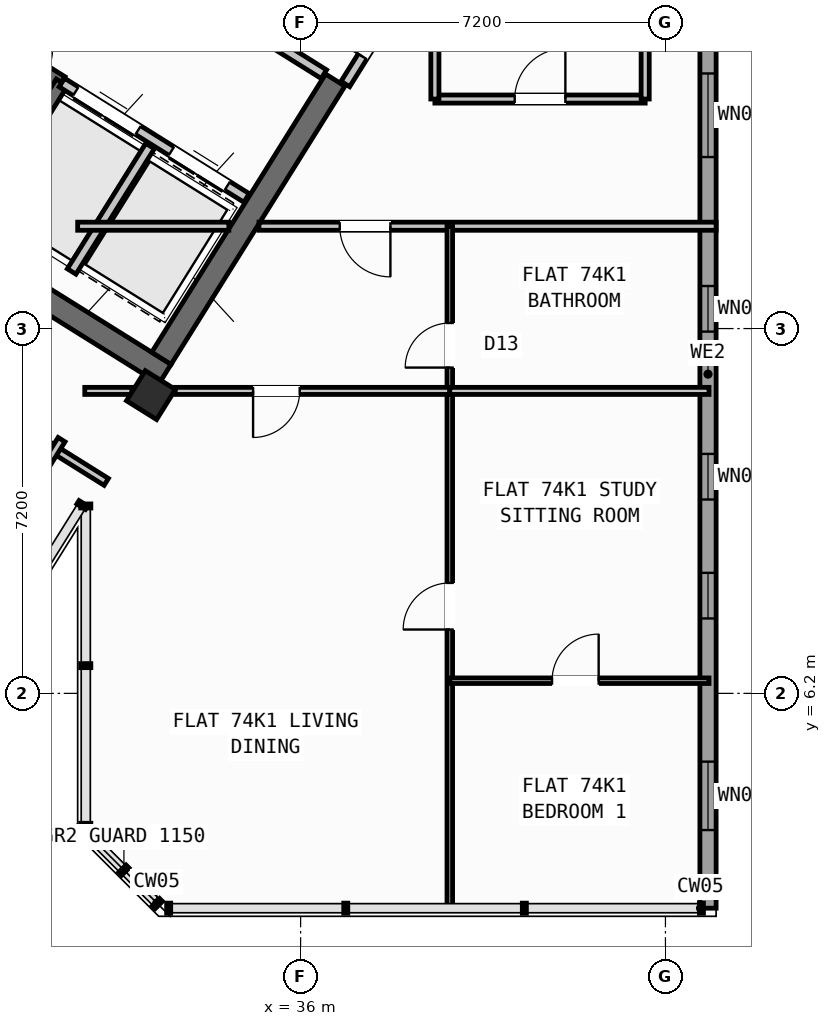
"""IFC4 building model, lengths in metres.
Left out: names, types, materials, properties, quantities, classifications, styles, units other than length and angle.
Written with IfcOpenShell. Run it as: python <this file> out.ifc"""

import sys

from ifc_helpers import new_model, si_unit, direction, frame, frame_2d, origin, origin_2d, place, context, subcontext, project, spatial, rectangle, hollow_rectangle, extrude, source, transform, mapped, element, fill, save


model = new_model("IFC4")
c1 = context("Model", 3, precision=1e-05, world=origin(), true_north=direction((0.0, 1.0)))
c2 = subcontext(c1, "Body", "Model", "MODEL_VIEW")
j1 = project(units=[si_unit("LENGTHUNIT", "METRE"), si_unit("PLANEANGLEUNIT", "RADIAN")], contexts=[c1])
p1 = place(None, origin())
s1 = spatial("IfcSite", under=j1, at=p1, CompositionType="ELEMENT")
p2 = place(p1, origin())
s2 = spatial("IfcBuilding", under=s1, at=p2, CompositionType="ELEMENT")
p3 = place(p2, frame((0.0, 0.0, 291.6)))
s3 = spatial("IfcBuildingStorey", under=s2, at=p3, CompositionType="ELEMENT", Elevation=291.6)
p4 = place(p3, frame((33.324, 12.503, 0.0), z_axis=(0.0, 0.0, 1.0), x_axis=(-0.848043529849, 0.529926571782, 0.0)))
e1 = element("IfcWall", 1, at=p4, inside=s3, PredefinedType="SHEAR", context=c2, shape_type="SweptSolid", body=[
    extrude(rectangle(XDim=13.04, YDim=0.45, at=frame_2d((6.52, 0.0))), origin(), (0.0, 0.0, 1.0), 3.35),
])
p5 = place(p3, frame((36.683, 18.304, 0.0), z_axis=(0.0, 0.0, 1.0), x_axis=(-0.529904039071, -0.848057609704, 0.0)))
e2 = element("IfcWall", 2, at=p5, inside=s3, PredefinedType="SHEAR", context=c2, shape_type="SweptSolid", body=[
    extrude(rectangle(XDim=6.475, YDim=0.45, at=frame_2d((3.238, 0.0))), origin(), (0.0, 0.0, 1.0), 3.35),
])
m1 = source(origin(), c2, "Body", "SweptSolid", [
    extrude(hollow_rectangle(XDim=0.7, YDim=0.7, WallThickness=0.028, at=origin_2d()), origin(), (0.0, 0.0, 1.0), 3.6),
])
p6 = place(p3, frame((33.046, 12.087, 0.0), z_axis=(0.0, 0.0, 1.0), x_axis=(-0.848048096156, 0.529919264233, 0.0)))
e3 = element("IfcColumn", 3, at=p6, inside=s3, PredefinedType="COLUMN", context=c2, shape_type="MappedRepresentation", body=[
    mapped(m1, transform((0.0, 0.0, 0.0), scale=1.0)),
])
p7 = place(p3, frame((44.04, 23.04, 0.0), z_axis=(0.0, 0.0, 1.0), x_axis=(0.0, -1.0, 0.0)))
e4 = element("IfcWall", 4, at=p7, inside=s3, PredefinedType="STANDARD", context=c2, shape_type="SweptSolid", body=[
    extrude(rectangle(XDim=21.08, YDim=0.32, at=frame_2d((10.54, 0.0))), origin(), (0.0, 0.0, 1.0), 3.35),
])
p8 = place(p7, frame((1.285, 0.0, 0.9)))
e5 = element("IfcOpeningElement", 5, at=p8, cuts=e4, PredefinedType="OPENING", context=c2, shape_type="SweptSolid", body=[
    extrude(rectangle(XDim=1.65, YDim=1.45, at=frame_2d((0.825, 0.725))), frame((0.0, 0.17, 0.0), z_axis=(0.0, -1.0, 0.0), x_axis=(1.0, 0.0, 0.0)), (0.0, 0.0, 1.0), 0.34),
])
p9 = place(p7, frame((4.605, 0.0, 0.9)))
e6 = element("IfcOpeningElement", 6, at=p9, cuts=e4, PredefinedType="OPENING", context=c2, shape_type="SweptSolid", body=[
    extrude(rectangle(XDim=1.65, YDim=1.45, at=frame_2d((0.825, 0.725))), frame((0.0, 0.17, 0.0), z_axis=(0.0, -1.0, 0.0), x_axis=(1.0, 0.0, 0.0)), (0.0, 0.0, 1.0), 0.34),
])
p10 = place(p7, frame((8.8, 0.0, 1.0)))
e7 = element("IfcOpeningElement", 7, at=p10, cuts=e4, PredefinedType="OPENING", context=c2, shape_type="SweptSolid", body=[
    extrude(rectangle(XDim=0.9, YDim=1.25, at=frame_2d((0.45, 0.625))), frame((0.0, 0.17, 0.0), z_axis=(0.0, -1.0, 0.0), x_axis=(1.0, 0.0, 0.0)), (0.0, 0.0, 1.0), 0.34),
])
p11 = place(p7, frame((12.114, 0.0, 1.0)))
e8 = element("IfcOpeningElement", 8, at=p11, cuts=e4, PredefinedType="OPENING", context=c2, shape_type="SweptSolid", body=[
    extrude(rectangle(XDim=0.9, YDim=1.25, at=frame_2d((0.45, 0.625))), frame((0.0, 0.17, 0.0), z_axis=(0.0, -1.0, 0.0), x_axis=(1.0, 0.0, 0.0)), (0.0, 0.0, 1.0), 0.34),
])
p12 = place(p7, frame((14.461, 0.0, 1.0)))
e9 = element("IfcOpeningElement", 9, at=p12, cuts=e4, PredefinedType="OPENING", context=c2, shape_type="SweptSolid", body=[
    extrude(rectangle(XDim=0.9, YDim=1.25, at=frame_2d((0.45, 0.625))), frame((0.0, 0.17, 0.0), z_axis=(0.0, -1.0, 0.0), x_axis=(1.0, 0.0, 0.0)), (0.0, 0.0, 1.0), 0.34),
])
p13 = place(p7, frame((18.188, 0.0, 0.9)))
e10 = element("IfcOpeningElement", 10, at=p13, cuts=e4, PredefinedType="OPENING", context=c2, shape_type="SweptSolid", body=[
    extrude(rectangle(XDim=1.35, YDim=1.45, at=frame_2d((0.675, 0.725))), frame((0.0, 0.17, 0.0), z_axis=(0.0, -1.0, 0.0), x_axis=(1.0, 0.0, 0.0)), (0.0, 0.0, 1.0), 0.34),
])
p14 = place(p3, frame((31.28, 18.261, 0.0), z_axis=(0.0, 0.0, 1.0), x_axis=(-0.848051618787, 0.529913626805, 0.0)))
e11 = element("IfcWall", 11, at=p14, inside=s3, PredefinedType="SHEAR", context=c2, shape_type="SweptSolid", body=[
    extrude(rectangle(XDim=7.46, YDim=0.26, at=frame_2d((3.73, 0.0))), origin(), (0.0, 0.0, 1.0), 3.35),
])
p15 = place(p14, frame((0.36, 0.0, 0.0)))
e12 = element("IfcOpeningElement", 12, at=p15, cuts=e11, PredefinedType="OPENING", context=c2, shape_type="SweptSolid", body=[
    extrude(rectangle(XDim=0.86, YDim=2.05, at=frame_2d((0.43, 1.025))), frame((0.0, 0.14, 0.0), z_axis=(0.0, -1.0, 0.0), x_axis=(1.0, 0.0, 0.0)), (0.0, 0.0, 1.0), 0.28),
])
p16 = place(p3, frame((31.288, 18.256, 0.0), z_axis=(0.0, 0.0, 1.0), x_axis=(-0.529943379326, -0.848033026897, 0.0)))
e13 = element("IfcWall", 13, at=p16, inside=s3, PredefinedType="SHEAR", context=c2, shape_type="SweptSolid", body=[
    extrude(rectangle(XDim=3.16, YDim=0.26, at=frame_2d((1.58, 0.0))), origin(), (0.0, 0.0, 1.0), 3.35),
])
p17 = place(p3, frame((34.933, 15.978, 0.0), z_axis=(0.0, 0.0, 1.0), x_axis=(-0.848055739377, 0.529907032327, 0.0)))
e14 = element("IfcWall", 14, at=p17, inside=s3, PredefinedType="STANDARD", context=c2, shape_type="SweptSolid", body=[
    extrude(rectangle(XDim=4.298, YDim=0.2, at=frame_2d((2.149, 0.0))), origin(), (0.0, 0.0, 1.0), 3.34),
])
p18 = place(p17, frame((0.448, 0.0, 0.0)))
e15 = element("IfcOpeningElement", 15, at=p18, cuts=e14, PredefinedType="OPENING", context=c2, shape_type="SweptSolid", body=[
    extrude(rectangle(XDim=1.3, YDim=2.2, at=frame_2d((0.65, 1.1))), frame((0.0, 0.11, 0.0), z_axis=(0.0, -1.0, 0.0), x_axis=(1.0, 0.0, 0.0)), (0.0, 0.0, 1.0), 0.22),
])
p19 = place(p17, frame((2.523, 0.0, 0.0)))
e16 = element("IfcOpeningElement", 16, at=p19, cuts=e14, PredefinedType="OPENING", context=c2, shape_type="SweptSolid", body=[
    extrude(rectangle(XDim=1.45, YDim=2.25, at=frame_2d((0.725, 1.125))), frame((0.0, 0.11, 0.0), z_axis=(0.0, -1.0, 0.0), x_axis=(1.0, 0.0, 0.0)), (0.0, 0.0, 1.0), 0.22),
])
p20 = place(p3, frame((36.459, 18.421, 0.0), z_axis=(0.0, 0.0, 1.0), x_axis=(-0.848059591691, 0.529900867089, 0.0)))
e17 = element("IfcWall", 17, at=p20, inside=s3, PredefinedType="STANDARD", context=c2, shape_type="SweptSolid", body=[
    extrude(rectangle(XDim=5.818, YDim=0.2, at=frame_2d((2.909, 0.0))), origin(), (0.0, 0.0, 1.0), 3.34),
])
p21 = place(p20, frame((2.598, 0.0, 0.0)))
e18 = element("IfcOpeningElement", 18, at=p21, cuts=e17, PredefinedType="OPENING", context=c2, shape_type="SweptSolid", body=[
    extrude(rectangle(XDim=1.15, YDim=2.1, at=frame_2d((0.575, 1.05))), frame((0.0, 0.11, 0.0), z_axis=(0.0, -1.0, 0.0), x_axis=(1.0, 0.0, 0.0)), (0.0, 0.0, 1.0), 0.22),
])
p22 = place(p3, frame((33.029, 17.003, 0.0), z_axis=(0.0, 0.0, 1.0), x_axis=(-0.529916267533, -0.848049968695, 0.0)))
e19 = element("IfcWall", 19, at=p22, inside=s3, PredefinedType="STANDARD", context=c2, shape_type="SweptSolid", body=[
    extrude(rectangle(XDim=2.92, YDim=0.2, at=frame_2d((1.46, 0.0))), origin(), (0.0, 0.0, 1.0), 3.34),
])
p23 = place(p3, frame((32.164, 10.374, 0.0), z_axis=(0.0, 0.0, 1.0), x_axis=(-0.848044107957, 0.529925646633, 0.0)))
e20 = element("IfcWall", 20, at=p23, inside=s3, PredefinedType="PARTITIONING", context=c2, shape_type="SweptSolid", body=[
    extrude(rectangle(XDim=15.57, YDim=0.16, at=frame_2d((7.785, 0.0))), origin(), (0.0, 0.0, 1.0), 3.34),
])
p24 = place(p23, frame((10.83, 0.0, 0.0)))
e21 = element("IfcOpeningElement", 21, at=p24, cuts=e20, PredefinedType="OPENING", context=c2, shape_type="SweptSolid", body=[
    extrude(rectangle(XDim=1.0, YDim=2.1, at=frame_2d((0.5, 1.05))), frame((0.0, 0.09, 0.0), z_axis=(0.0, -1.0, 0.0), x_axis=(1.0, 0.0, 0.0)), (0.0, 0.0, 1.0), 0.18),
])
p25 = place(p3, frame((31.282, 11.208, 0.0), z_axis=(0.0, 0.0, 1.0), x_axis=(-0.529938869374, -0.84803584519, 0.0)))
e22 = element("IfcWall", 22, at=p25, inside=s3, PredefinedType="PARTITIONING", context=c2, shape_type="SweptSolid", body=[
    extrude(rectangle(XDim=5.48, YDim=0.16, at=frame_2d((2.74, 0.0))), origin(), (0.0, 0.0, 1.0), 3.34),
])
p26 = place(p3, frame((38.451, 20.737, 0.0), z_axis=(0.0, 0.0, 1.0), x_axis=(-0.529924799939, -0.848044637038, 0.0)))
e23 = element("IfcWall", 23, at=p26, inside=s3, PredefinedType="STANDARD", context=c2, shape_type="SweptSolid", body=[
    extrude(rectangle(XDim=2.96, YDim=0.2, at=frame_2d((1.48, 0.0))), origin(), (0.0, 0.0, 1.0), 3.34),
])
p27 = place(p26, frame((1.46, 0.0, 0.0)))
e24 = element("IfcOpeningElement", 24, at=p27, cuts=e23, PredefinedType="OPENING", context=c2, shape_type="SweptSolid", body=[
    extrude(rectangle(XDim=0.86, YDim=2.05, at=frame_2d((0.43, 1.025))), frame((0.0, 0.11, 0.0), z_axis=(0.0, -1.0, 0.0), x_axis=(1.0, 0.0, 0.0)), (0.0, 0.0, 1.0), 0.22),
])
p28 = place(p3, frame((31.6, 15.42, 0.0), z_axis=(0.0, 0.0, 1.0), x_axis=(1.0, 0.0, 0.0)))
e25 = element("IfcWall", 25, at=p28, inside=s3, PredefinedType="PARTITIONING", context=c2, shape_type="SweptSolid", body=[
    extrude(rectangle(XDim=2.984, YDim=0.16, at=frame_2d((1.492, 0.0))), origin(), (0.0, 0.0, 1.0), 3.34),
])
p29 = place(p3, frame((35.178, 15.42, 0.0), z_axis=(0.0, 0.0, 1.0), x_axis=(1.0, 0.0, 0.0)))
e26 = element("IfcWall", 26, at=p29, inside=s3, PredefinedType="PARTITIONING", context=c2, shape_type="SweptSolid", body=[
    extrude(rectangle(XDim=9.021, YDim=0.16, at=frame_2d((4.511, 0.0))), origin(), (0.0, 0.0, 1.0), 3.34),
])
p30 = place(p29, frame((1.594, 0.0, 0.0)))
e27 = element("IfcOpeningElement", 27, at=p30, cuts=e26, PredefinedType="OPENING", context=c2, shape_type="SweptSolid", body=[
    extrude(rectangle(XDim=1.0, YDim=2.1, at=frame_2d((0.5, 1.05))), frame((0.0, 0.09, 0.0), z_axis=(0.0, -1.0, 0.0), x_axis=(1.0, 0.0, 0.0)), (0.0, 0.0, 1.0), 0.18),
])
p31 = place(p3, frame((38.65, 17.93, 0.0), z_axis=(0.0, 0.0, 1.0), x_axis=(1.0, 0.0, 0.0)))
e28 = element("IfcWall", 28, at=p31, inside=s3, PredefinedType="PARTITIONING", context=c2, shape_type="SweptSolid", body=[
    extrude(rectangle(XDim=4.15, YDim=0.16, at=frame_2d((2.075, 0.0))), origin(), (0.0, 0.0, 1.0), 3.34),
])
p32 = place(p31, frame((1.575, 0.0, 0.0)))
e29 = element("IfcOpeningElement", 29, at=p32, cuts=e28, PredefinedType="OPENING", context=c2, shape_type="SweptSolid", body=[
    extrude(rectangle(XDim=1.0, YDim=2.1, at=frame_2d((0.5, 1.05))), frame((0.0, 0.09, 0.0), z_axis=(0.0, -1.0, 0.0), x_axis=(1.0, 0.0, 0.0)), (0.0, 0.0, 1.0), 0.18),
])
p33 = place(p3, frame((38.65, 17.93, 0.0), z_axis=(0.0, 0.0, 1.0), x_axis=(0.0, 1.0, 0.0)))
e30 = element("IfcWall", 30, at=p33, inside=s3, PredefinedType="PARTITIONING", context=c2, shape_type="SweptSolid", body=[
    extrude(rectangle(XDim=3.046, YDim=0.16, at=frame_2d((1.523, 0.0))), origin(), (0.0, 0.0, 1.0), 3.34),
])
p34 = place(p3, frame((42.8, 17.93, 0.0), z_axis=(0.0, 0.0, 1.0), x_axis=(0.0, 1.0, 0.0)))
e31 = element("IfcWall", 31, at=p34, inside=s3, PredefinedType="PARTITIONING", context=c2, shape_type="SweptSolid", body=[
    extrude(rectangle(XDim=3.57, YDim=0.16, at=frame_2d((1.785, 0.0))), origin(), (0.0, 0.0, 1.0), 3.34),
])
p35 = place(p3, frame((38.944, 1.96, 0.0), z_axis=(0.0, 0.0, 1.0), x_axis=(0.0, 1.0, 0.0)))
e32 = element("IfcWall", 32, at=p35, inside=s3, PredefinedType="PARTITIONING", context=c2, shape_type="SweptSolid", body=[
    extrude(rectangle(XDim=13.46, YDim=0.11, at=frame_2d((6.73, 0.0))), origin(), (0.0, 0.0, 1.0), 3.34),
])
p36 = place(p35, frame((5.5, 0.0, 0.0)))
e33 = element("IfcOpeningElement", 33, at=p36, cuts=e32, PredefinedType="OPENING", context=c2, shape_type="SweptSolid", body=[
    extrude(rectangle(XDim=0.92, YDim=2.08, at=frame_2d((0.46, 1.04))), frame((0.0, 0.065, 0.0), z_axis=(0.0, -1.0, 0.0), x_axis=(1.0, 0.0, 0.0)), (0.0, 0.0, 1.0), 0.13),
])
p37 = place(p35, frame((10.67, 0.0, 0.0)))
e34 = element("IfcOpeningElement", 34, at=p37, cuts=e32, PredefinedType="OPENING", context=c2, shape_type="SweptSolid", body=[
    extrude(rectangle(XDim=0.88, YDim=2.08, at=frame_2d((0.44, 1.04))), frame((0.0, 0.065, 0.0), z_axis=(0.0, -1.0, 0.0), x_axis=(1.0, 0.0, 0.0)), (0.0, 0.0, 1.0), 0.13),
])
p38 = place(p3, frame((31.74, 12.17, 0.0), z_axis=(0.0, 0.0, 1.0), x_axis=(1.0, 0.0, 0.0)))
e35 = element("IfcWall", 35, at=p38, inside=s3, PredefinedType="PLUMBINGWALL", context=c2, shape_type="SweptSolid", body=[
    extrude(rectangle(XDim=0.931, YDim=0.14, at=frame_2d((0.466, 0.0))), origin(), (0.0, 0.0, 1.0), 3.34),
])
p39 = place(p3, frame((33.525, 12.17, 0.0), z_axis=(0.0, 0.0, 1.0), x_axis=(1.0, 0.0, 0.0)))
e36 = element("IfcWall", 36, at=p39, inside=s3, PredefinedType="PLUMBINGWALL", context=c2, shape_type="SweptSolid", body=[
    extrude(rectangle(XDim=5.419, YDim=0.14, at=frame_2d((2.709, 0.0))), origin(), (0.0, 0.0, 1.0), 3.34),
])
p40 = place(p39, frame((1.537, 0.0, 0.0)))
e37 = element("IfcOpeningElement", 37, at=p40, cuts=e36, PredefinedType="OPENING", context=c2, shape_type="SweptSolid", body=[
    extrude(rectangle(XDim=0.92, YDim=2.08, at=frame_2d((0.46, 1.04))), frame((0.0, 0.08, 0.0), z_axis=(0.0, -1.0, 0.0), x_axis=(1.0, 0.0, 0.0)), (0.0, 0.0, 1.0), 0.16),
])
p41 = place(p3, frame((38.944, 12.17, 0.0), z_axis=(0.0, 0.0, 1.0), x_axis=(1.0, 0.0, 0.0)))
e38 = element("IfcWall", 38, at=p41, inside=s3, PredefinedType="PLUMBINGWALL", context=c2, shape_type="SweptSolid", body=[
    extrude(rectangle(XDim=5.116, YDim=0.14, at=frame_2d((2.558, 0.0))), origin(), (0.0, 0.0, 1.0), 3.34),
])
p42 = place(p3, frame((38.944, 6.45, 0.0), z_axis=(0.0, 0.0, 1.0), x_axis=(1.0, 0.0, 0.0)))
e39 = element("IfcWall", 39, at=p42, inside=s3, PredefinedType="PARTITIONING", context=c2, shape_type="SweptSolid", body=[
    extrude(rectangle(XDim=5.116, YDim=0.11, at=frame_2d((2.558, 0.0))), origin(), (0.0, 0.0, 1.0), 3.34),
])
p43 = place(p42, frame((2.018, 0.0, 0.0)))
e40 = element("IfcOpeningElement", 40, at=p43, cuts=e39, PredefinedType="OPENING", context=c2, shape_type="SweptSolid", body=[
    extrude(rectangle(XDim=0.92, YDim=2.08, at=frame_2d((0.46, 1.04))), frame((0.0, 0.065, 0.0), z_axis=(0.0, -1.0, 0.0), x_axis=(1.0, 0.0, 0.0)), (0.0, 0.0, 1.0), 0.13),
])
m2 = source(origin(), c2, "Body", "SweptSolid", [
    extrude(rectangle(XDim=1.65, YDim=1.45, at=frame_2d((0.825, 0.725))), frame((0.0, 0.03, 0.0), z_axis=(0.0, -1.0, 0.0), x_axis=(1.0, 0.0, 0.0)), (0.0, 0.0, 1.0), 0.06),
])
p44 = place(p9, origin())
e41 = element("IfcWindow", 41, at=p44, inside=s3, PartitioningType="SINGLE_PANEL", PredefinedType="WINDOW", context=c2, shape_type="MappedRepresentation", body=[
    mapped(m2, transform((0.0, 0.0, 0.0), scale=1.0)),
])
fill(e6, e41)
m3 = source(origin(), c2, "Body", "SweptSolid", [
    extrude(rectangle(XDim=0.9, YDim=1.25, at=frame_2d((0.45, 0.625))), frame((0.0, 0.03, 0.0), z_axis=(0.0, -1.0, 0.0), x_axis=(1.0, 0.0, 0.0)), (0.0, 0.0, 1.0), 0.06),
])
p45 = place(p10, origin())
e42 = element("IfcWindow", 42, at=p45, inside=s3, PartitioningType="SINGLE_PANEL", PredefinedType="WINDOW", context=c2, shape_type="MappedRepresentation", body=[
    mapped(m3, transform((0.0, 0.0, 0.0), scale=1.0)),
])
fill(e7, e42)
p46 = place(p11, origin())
e43 = element("IfcWindow", 43, at=p46, inside=s3, PartitioningType="SINGLE_PANEL", PredefinedType="WINDOW", context=c2, shape_type="MappedRepresentation", body=[
    mapped(m3, transform((0.0, 0.0, 0.0), scale=1.0)),
])
fill(e8, e43)
p47 = place(p12, origin())
e44 = element("IfcWindow", 44, at=p47, inside=s3, PartitioningType="SINGLE_PANEL", PredefinedType="WINDOW", context=c2, shape_type="MappedRepresentation", body=[
    mapped(m3, transform((0.0, 0.0, 0.0), scale=1.0)),
])
fill(e9, e44)
m4 = source(origin(), c2, "Body", "SweptSolid", [
    extrude(rectangle(XDim=1.35, YDim=1.45, at=frame_2d((0.675, 0.725))), frame((0.0, 0.03, 0.0), z_axis=(0.0, -1.0, 0.0), x_axis=(1.0, 0.0, 0.0)), (0.0, 0.0, 1.0), 0.06),
])
p48 = place(p13, origin())
e45 = element("IfcWindow", 45, at=p48, inside=s3, PartitioningType="SINGLE_PANEL", PredefinedType="WINDOW", context=c2, shape_type="MappedRepresentation", body=[
    mapped(m4, transform((0.0, 0.0, 0.0), scale=1.0)),
])
fill(e10, e45)
m5 = source(origin(), c2, "Body", "SweptSolid", [
    extrude(rectangle(XDim=1.3, YDim=2.2, at=frame_2d((0.65, 1.1))), frame((0.0, 0.025, 0.0), z_axis=(0.0, -1.0, 0.0), x_axis=(1.0, 0.0, 0.0)), (0.0, 0.0, 1.0), 0.05),
])
p49 = place(p18, origin())
e46 = element("IfcDoor", 46, at=p49, inside=s3, OperationType="DOUBLE_DOOR_SLIDING", PredefinedType="DOOR", context=c2, shape_type="MappedRepresentation", body=[
    mapped(m5, transform((0.0, 0.0, 0.0), scale=1.0)),
])
fill(e15, e46)
m6 = source(origin(), c2, "Body", "SweptSolid", [
    extrude(rectangle(XDim=1.45, YDim=2.25, at=frame_2d((0.725, 1.125))), frame((0.0, 0.025, 0.0), z_axis=(0.0, -1.0, 0.0), x_axis=(1.0, 0.0, 0.0)), (0.0, 0.0, 1.0), 0.05),
])
p50 = place(p19, origin())
e47 = element("IfcDoor", 47, at=p50, inside=s3, OperationType="DOUBLE_DOOR_SLIDING", PredefinedType="DOOR", context=c2, shape_type="MappedRepresentation", body=[
    mapped(m6, transform((0.0, 0.0, 0.0), scale=1.0)),
])
fill(e16, e47)
m7 = source(origin(), c2, "Body", "SweptSolid", [
    extrude(rectangle(XDim=1.0, YDim=2.1, at=frame_2d((0.5, 1.05))), frame((0.0, 0.025, 0.0), z_axis=(0.0, -1.0, 0.0), x_axis=(1.0, 0.0, 0.0)), (0.0, 0.0, 1.0), 0.05),
])
p51 = place(p32, origin())
e48 = element("IfcDoor", 48, at=p51, inside=s3, OperationType="SINGLE_SWING_RIGHT", PredefinedType="DOOR", context=c2, shape_type="MappedRepresentation", body=[
    mapped(m7, transform((0.0, 0.0, 0.0), scale=1.0)),
])
fill(e29, e48)
m8 = source(origin(), c2, "Body", "SweptSolid", [
    extrude(rectangle(XDim=0.86, YDim=2.05, at=frame_2d((0.43, 1.025))), frame((0.0, 0.025, 0.0), z_axis=(0.0, -1.0, 0.0), x_axis=(1.0, 0.0, 0.0)), (0.0, 0.0, 1.0), 0.05),
])
p52 = place(p27, frame((0.86, 0.0, 0.0), z_axis=(0.0, 0.0, 1.0), x_axis=(-1.0, 0.0, 0.0)))
e49 = element("IfcDoor", 49, at=p52, inside=s3, OperationType="SINGLE_SWING_LEFT", PredefinedType="DOOR", context=c2, shape_type="MappedRepresentation", body=[
    mapped(m8, transform((0.0, 0.0, 0.0), scale=1.0)),
])
fill(e24, e49)
m9 = source(origin(), c2, "Body", "SweptSolid", [
    extrude(rectangle(XDim=0.92, YDim=2.08, at=frame_2d((0.46, 1.04))), frame((0.0, 0.025, 0.0), z_axis=(0.0, -1.0, 0.0), x_axis=(1.0, 0.0, 0.0)), (0.0, 0.0, 1.0), 0.05),
])
p53 = place(p36, origin())
e50 = element("IfcDoor", 50, at=p53, inside=s3, OperationType="SINGLE_SWING_LEFT", PredefinedType="DOOR", context=c2, shape_type="MappedRepresentation", body=[
    mapped(m9, transform((0.0, 0.0, 0.0), scale=1.0)),
])
fill(e33, e50)
p54 = place(p43, origin())
e51 = element("IfcDoor", 51, at=p54, inside=s3, OperationType="SINGLE_SWING_RIGHT", PredefinedType="DOOR", context=c2, shape_type="MappedRepresentation", body=[
    mapped(m9, transform((0.0, 0.0, 0.0), scale=1.0)),
])
fill(e40, e51)
p55 = place(p30, frame((1.0, 0.0, 0.0), z_axis=(0.0, 0.0, 1.0), x_axis=(-1.0, 0.0, 0.0)))
e52 = element("IfcDoor", 52, at=p55, inside=s3, OperationType="SINGLE_SWING_LEFT", PredefinedType="DOOR", context=c2, shape_type="MappedRepresentation", body=[
    mapped(m7, transform((0.0, 0.0, 0.0), scale=1.0)),
])
fill(e27, e52)
p56 = place(p40, frame((0.92, 0.0, 0.0), z_axis=(0.0, 0.0, 1.0), x_axis=(-1.0, 0.0, 0.0)))
e53 = element("IfcDoor", 53, at=p56, inside=s3, OperationType="SINGLE_SWING_RIGHT", PredefinedType="DOOR", context=c2, shape_type="MappedRepresentation", body=[
    mapped(m9, transform((0.0, 0.0, 0.0), scale=1.0)),
])
fill(e37, e53)
m10 = source(origin(), c2, "Body", "SweptSolid", [
    extrude(rectangle(XDim=0.88, YDim=2.08, at=frame_2d((0.44, 1.04))), frame((0.0, 0.025, 0.0), z_axis=(0.0, -1.0, 0.0), x_axis=(1.0, 0.0, 0.0)), (0.0, 0.0, 1.0), 0.05),
])
p57 = place(p37, origin())
e54 = element("IfcDoor", 54, at=p57, inside=s3, OperationType="SINGLE_SWING_LEFT", PredefinedType="DOOR", context=c2, shape_type="MappedRepresentation", body=[
    mapped(m10, transform((0.0, 0.0, 0.0), scale=1.0)),
])
fill(e34, e54)
save(model, sys.argv[1])
